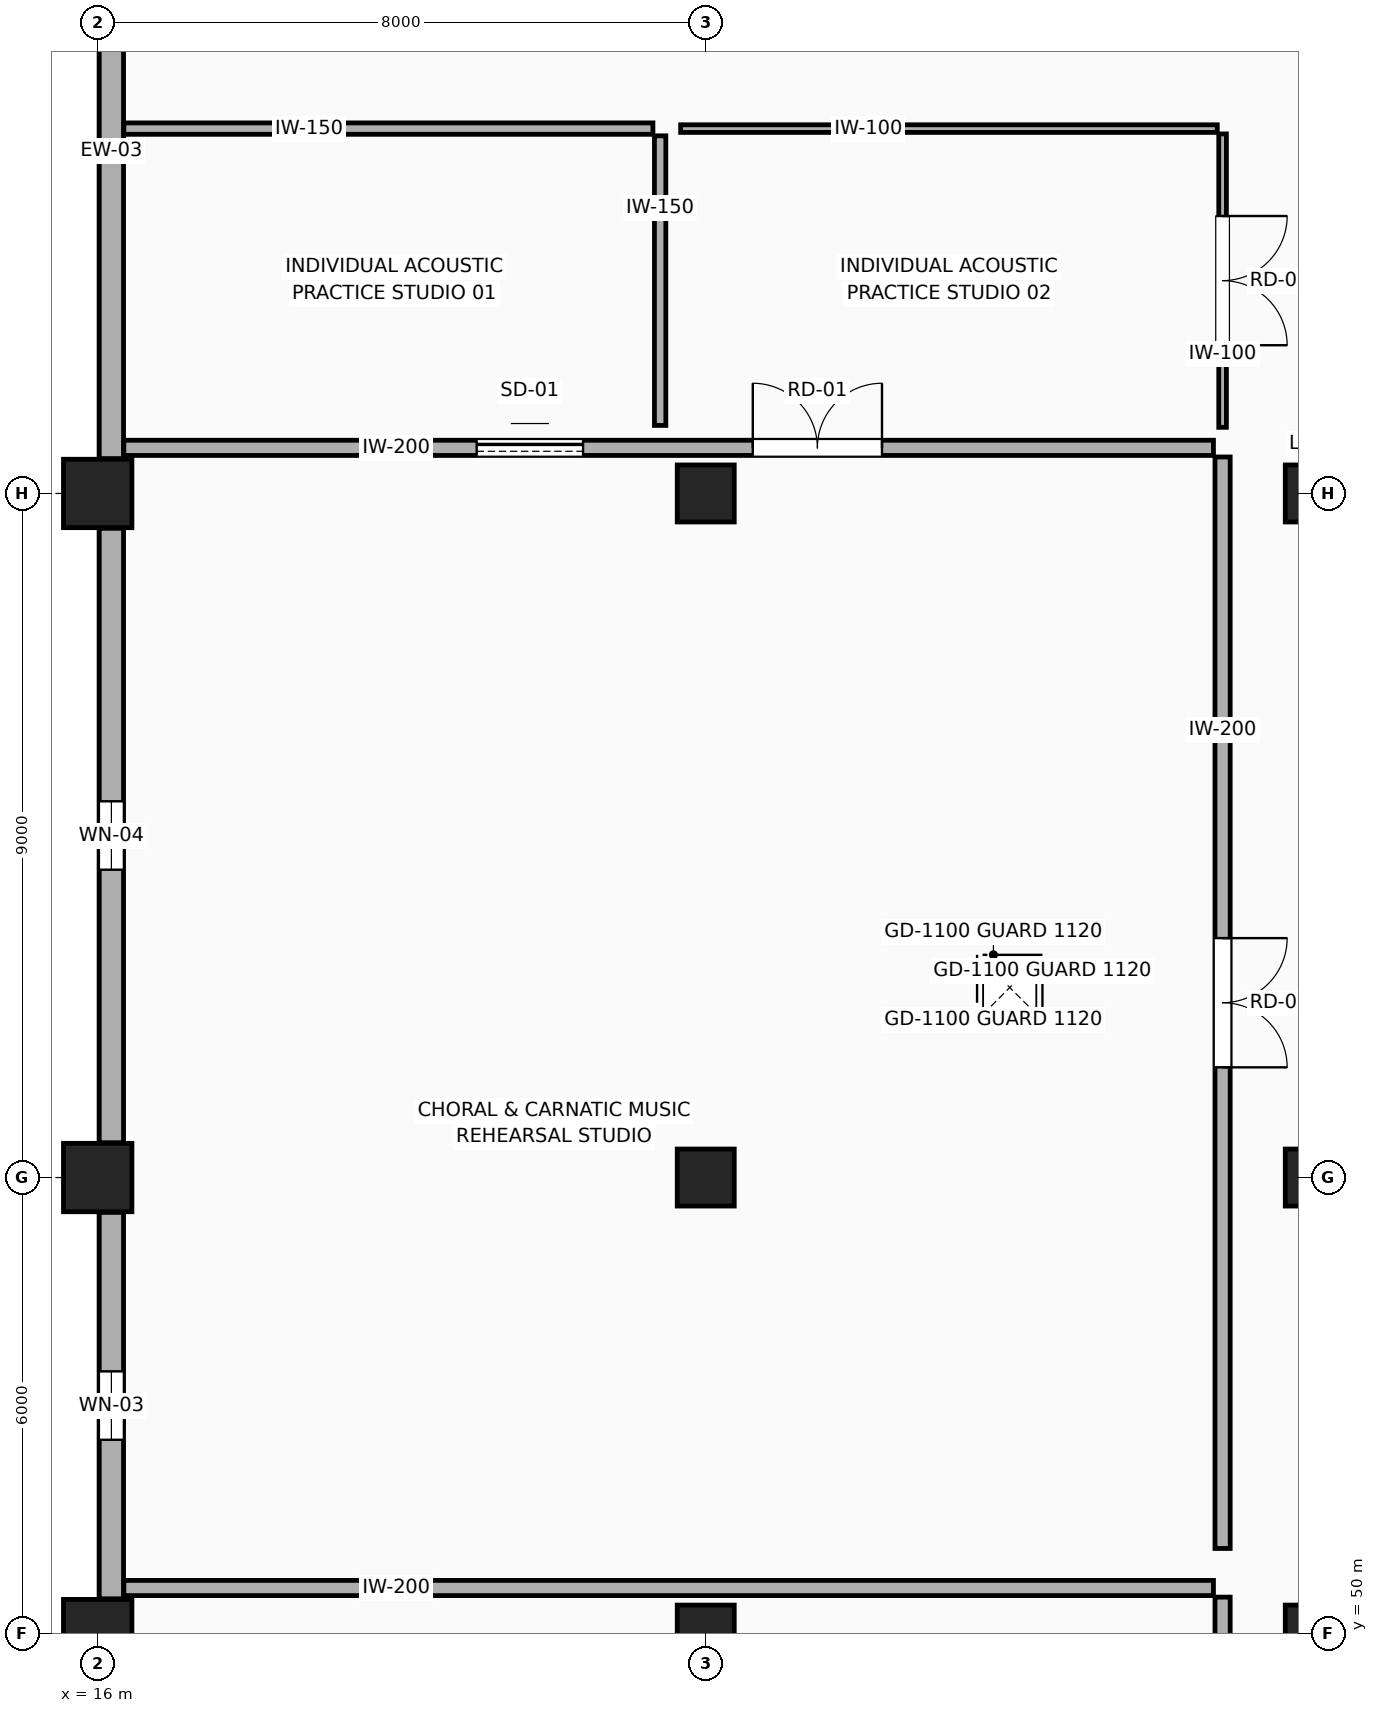
"""IFC4 building model, lengths in metres.
Left out: names, types, materials, properties, quantities, classifications, styles, units other than length and angle.
Written with IfcOpenShell. Run it as: python <this file> out.ifc"""

import sys

from ifc_helpers import new_model, si_unit, direction, frame, frame_2d, origin, origin_2d, place, context, subcontext, project, spatial, rectangle, extrude, element, fill, save


model = new_model("IFC4")
c1 = context("Model", 3, precision=1e-05, world=origin(), true_north=direction((0.0, 1.0)))
c2 = subcontext(c1, "Body", "Model", "MODEL_VIEW")
j1 = project(units=[si_unit("LENGTHUNIT", "METRE"), si_unit("PLANEANGLEUNIT", "RADIAN")], contexts=[c1])
p1 = place(None, origin())
s1 = spatial("IfcSite", under=j1, at=p1, CompositionType="ELEMENT")
p2 = place(p1, origin())
s2 = spatial("IfcBuilding", under=s1, at=p2, CompositionType="ELEMENT")
p3 = place(p2, frame((0.0, 0.0, 19.8)))
s3 = spatial("IfcBuildingStorey", under=s2, at=p3, CompositionType="ELEMENT", Elevation=19.8)
for number, where, z_axis, x_axis in (
    (1, (16.0, 50.0, 0.0), (0.0, 0.0, 1.0), (1.0, 0.0, 0.0)),
    (2, (16.0, 56.0, 0.0), (0.0, 0.0, 1.0), (1.0, 0.0, 0.0)),
    (3, (16.0, 65.0, 0.0), (0.0, 0.0, 1.0), (1.0, 0.0, 0.0)),
):
    element("IfcColumn", number, at=place(p3, frame(where, z_axis=z_axis, x_axis=x_axis)), inside=s3, PredefinedType="COLUMN", context=c2, shape_type="SweptSolid", body=[
        extrude(rectangle(XDim=0.9, YDim=0.9, at=origin_2d()), origin(), (0.0, 0.0, 1.0), 4.5),
    ])
for number, where, z_axis, x_axis in (
    (4, (24.0, 50.0, 0.0), (0.0, 0.0, 1.0), (1.0, 0.0, 0.0)),
    (5, (24.0, 56.0, 0.0), (0.0, 0.0, 1.0), (1.0, 0.0, 0.0)),
    (6, (24.0, 65.0, 0.0), (0.0, 0.0, 1.0), (1.0, 0.0, 0.0)),
    (7, (32.0, 50.0, 0.0), (0.0, 0.0, 1.0), (1.0, 0.0, 0.0)),
    (8, (32.0, 56.0, 0.0), (0.0, 0.0, 1.0), (1.0, 0.0, 0.0)),
    (9, (32.0, 65.0, 0.0), (0.0, 0.0, 1.0), (1.0, 0.0, 0.0)),
):
    element("IfcColumn", number, at=place(p3, frame(where, z_axis=z_axis, x_axis=x_axis)), inside=s3, PredefinedType="COLUMN", context=c2, shape_type="SweptSolid", body=[
        extrude(rectangle(XDim=0.75, YDim=0.75, at=origin_2d()), origin(), (0.0, 0.0, 1.0), 4.5),
    ])
p4 = place(p3, frame((16.18, 50.458, 0.0), z_axis=(0.0, 0.0, 1.0), x_axis=(0.0, 1.0, 0.0)))
e10 = element("IfcWall", 10, at=p4, inside=s3, PredefinedType="STANDARD", context=c2, shape_type="SweptSolid", body=[
    extrude(rectangle(XDim=5.084, YDim=0.32, at=frame_2d((2.542, 0.0))), origin(), (0.0, 0.0, 1.0), 3.785),
])
p5 = place(p4, frame((2.092, 0.0, 0.95)))
e11 = element("IfcOpeningElement", 11, at=p5, cuts=e10, PredefinedType="OPENING", context=c2, shape_type="SweptSolid", body=[
    extrude(rectangle(XDim=0.9, YDim=1.8, at=frame_2d((0.45, 0.9))), frame((0.0, 0.17, 0.0), z_axis=(0.0, -1.0, 0.0), x_axis=(1.0, 0.0, 0.0)), (0.0, 0.0, 1.0), 0.34),
])
p6 = place(p3, frame((16.18, 56.458, 0.0), z_axis=(0.0, 0.0, 1.0), x_axis=(0.0, 1.0, 0.0)))
e12 = element("IfcWall", 12, at=p6, inside=s3, PredefinedType="STANDARD", context=c2, shape_type="SweptSolid", body=[
    extrude(rectangle(XDim=8.084, YDim=0.32, at=frame_2d((4.042, 0.0))), origin(), (0.0, 0.0, 1.0), 3.835),
])
p7 = place(p6, frame((3.592, 0.0, 0.95)))
e13 = element("IfcOpeningElement", 13, at=p7, cuts=e12, PredefinedType="OPENING", context=c2, shape_type="SweptSolid", body=[
    extrude(rectangle(XDim=0.9, YDim=2.1, at=frame_2d((0.45, 1.05))), frame((0.0, 0.17, 0.0), z_axis=(0.0, -1.0, 0.0), x_axis=(1.0, 0.0, 0.0)), (0.0, 0.0, 1.0), 0.34),
])
p8 = place(p3, frame((16.18, 65.458, 0.0), z_axis=(0.0, 0.0, 1.0), x_axis=(0.0, 1.0, 0.0)))
e14 = element("IfcWall", 14, at=p8, inside=s3, PredefinedType="STANDARD", context=c2, shape_type="SweptSolid", body=[
    extrude(rectangle(XDim=8.084, YDim=0.32, at=frame_2d((4.042, 0.0))), origin(), (0.0, 0.0, 1.0), 3.885),
])
p9 = place(p3, frame((16.344, 50.6, 0.0), z_axis=(0.0, 0.0, 1.0), x_axis=(1.0, 0.0, 0.0)))
e15 = element("IfcWall", 15, at=p9, inside=s3, PredefinedType="PARTITIONING", context=c2, shape_type="SweptSolid", body=[
    extrude(rectangle(XDim=14.336, YDim=0.2, at=frame_2d((7.168, 0.0))), origin(), (0.0, 0.0, 1.0), 4.5),
])
p10 = place(p3, frame((30.8, 50.48, 0.0), z_axis=(0.0, 0.0, 1.0), x_axis=(0.0, -1.0, 0.0)))
e16 = element("IfcWall", 16, at=p10, inside=s3, PredefinedType="PARTITIONING", context=c2, shape_type="SweptSolid", body=[
    extrude(rectangle(XDim=19.16, YDim=0.2, at=frame_2d((9.58, 0.0))), origin(), (0.0, 0.0, 1.0), 4.5),
])
p11 = place(p10, frame((8.73, 0.0, 0.0)))
e17 = element("IfcOpeningElement", 17, at=p11, cuts=e16, PredefinedType="OPENING", context=c2, shape_type="SweptSolid", body=[
    extrude(rectangle(XDim=1.7, YDim=2.25, at=frame_2d((0.85, 1.125))), frame((0.0, 0.11, 0.0), z_axis=(0.0, -1.0, 0.0), x_axis=(1.0, 0.0, 0.0)), (0.0, 0.0, 1.0), 0.22),
])
p12 = place(p3, frame((16.344, 65.6, 0.0), z_axis=(0.0, 0.0, 1.0), x_axis=(1.0, 0.0, 0.0)))
e18 = element("IfcWall", 18, at=p12, inside=s3, PredefinedType="PARTITIONING", context=c2, shape_type="SweptSolid", body=[
    extrude(rectangle(XDim=14.336, YDim=0.2, at=frame_2d((7.168, 0.0))), origin(), (0.0, 0.0, 1.0), 4.24),
])
p13 = place(p12, frame((4.642, 0.0, 0.0)))
e19 = element("IfcOpeningElement", 19, at=p13, cuts=e18, PredefinedType="OPENING", context=c2, shape_type="SweptSolid", body=[
    extrude(rectangle(XDim=1.4, YDim=2.15, at=frame_2d((0.7, 1.075))), frame((0.0, 0.11, 0.0), z_axis=(0.0, -1.0, 0.0), x_axis=(1.0, 0.0, 0.0)), (0.0, 0.0, 1.0), 0.22),
])
p14 = place(p12, frame((8.275, 0.0, 0.0)))
e20 = element("IfcOpeningElement", 20, at=p14, cuts=e18, PredefinedType="OPENING", context=c2, shape_type="SweptSolid", body=[
    extrude(rectangle(XDim=1.7, YDim=2.25, at=frame_2d((0.85, 1.125))), frame((0.0, 0.11, 0.0), z_axis=(0.0, -1.0, 0.0), x_axis=(1.0, 0.0, 0.0)), (0.0, 0.0, 1.0), 0.22),
])
p15 = place(p3, frame((30.8, 65.48, 0.0), z_axis=(0.0, 0.0, 1.0), x_axis=(0.0, -1.0, 0.0)))
e21 = element("IfcWall", 21, at=p15, inside=s3, PredefinedType="PARTITIONING", context=c2, shape_type="SweptSolid", body=[
    extrude(rectangle(XDim=14.36, YDim=0.2, at=frame_2d((7.18, 0.0))), origin(), (0.0, 0.0, 1.0), 4.24),
])
p16 = place(p15, frame((6.33, 0.0, 0.0)))
e22 = element("IfcOpeningElement", 22, at=p16, cuts=e21, PredefinedType="OPENING", context=c2, shape_type="SweptSolid", body=[
    extrude(rectangle(XDim=1.7, YDim=2.25, at=frame_2d((0.85, 1.125))), frame((0.0, 0.11, 0.0), z_axis=(0.0, -1.0, 0.0), x_axis=(1.0, 0.0, 0.0)), (0.0, 0.0, 1.0), 0.22),
])
p17 = place(p3, frame((16.344, 69.8, 0.0), z_axis=(0.0, 0.0, 1.0), x_axis=(1.0, 0.0, 0.0)))
e23 = element("IfcWall", 23, at=p17, inside=s3, PredefinedType="PARTITIONING", context=c2, shape_type="SweptSolid", body=[
    extrude(rectangle(XDim=6.961, YDim=0.15, at=frame_2d((3.48, 0.0))), origin(), (0.0, 0.0, 1.0), 4.5),
])
p18 = place(p3, frame((23.4, 69.705, 0.0), z_axis=(0.0, 0.0, 1.0), x_axis=(0.0, -1.0, 0.0)))
e24 = element("IfcWall", 24, at=p18, inside=s3, PredefinedType="PARTITIONING", context=c2, shape_type="SweptSolid", body=[
    extrude(rectangle(XDim=3.81, YDim=0.15, at=frame_2d((1.905, 0.0))), origin(), (0.0, 0.0, 1.0), 4.5),
])
p19 = place(p3, frame((23.67, 69.8, 0.0), z_axis=(0.0, 0.0, 1.0), x_axis=(1.0, 0.0, 0.0)))
e25 = element("IfcWall", 25, at=p19, inside=s3, PredefinedType="PARTITIONING", context=c2, shape_type="SweptSolid", body=[
    extrude(rectangle(XDim=7.06, YDim=0.1, at=frame_2d((3.53, 0.0))), origin(), (0.0, 0.0, 1.0), 4.24),
])
p20 = place(p3, frame((30.8, 69.73, 0.0), z_axis=(0.0, 0.0, 1.0), x_axis=(0.0, -1.0, 0.0)))
e26 = element("IfcWall", 26, at=p20, inside=s3, PredefinedType="PARTITIONING", context=c2, shape_type="SweptSolid", body=[
    extrude(rectangle(XDim=3.86, YDim=0.1, at=frame_2d((1.93, 0.0))), origin(), (0.0, 0.0, 1.0), 4.24),
])
p21 = place(p20, frame((1.08, 0.0, 0.0)))
e27 = element("IfcOpeningElement", 27, at=p21, cuts=e26, PredefinedType="OPENING", context=c2, shape_type="SweptSolid", body=[
    extrude(rectangle(XDim=1.7, YDim=2.25, at=frame_2d((0.85, 1.125))), frame((0.0, 0.06, 0.0), z_axis=(0.0, -1.0, 0.0), x_axis=(1.0, 0.0, 0.0)), (0.0, 0.0, 1.0), 0.12),
])
p22 = place(p5, origin())
e28 = element("IfcWindow", 28, at=p22, inside=s3, PartitioningType="SINGLE_PANEL", PredefinedType="WINDOW", context=c2, shape_type="SweptSolid", body=[
    extrude(rectangle(XDim=0.9, YDim=1.8, at=frame_2d((0.45, 0.9))), frame((0.0, 0.03, 0.0), z_axis=(0.0, -1.0, 0.0), x_axis=(1.0, 0.0, 0.0)), (0.0, 0.0, 1.0), 0.06),
])
fill(e11, e28)
p23 = place(p7, origin())
e29 = element("IfcWindow", 29, at=p23, inside=s3, PartitioningType="SINGLE_PANEL", PredefinedType="WINDOW", context=c2, shape_type="SweptSolid", body=[
    extrude(rectangle(XDim=0.9, YDim=2.1, at=frame_2d((0.45, 1.05))), frame((0.0, 0.03, 0.0), z_axis=(0.0, -1.0, 0.0), x_axis=(1.0, 0.0, 0.0)), (0.0, 0.0, 1.0), 0.06),
])
fill(e13, e29)
p24 = place(p16, origin())
e30 = element("IfcDoor", 30, at=p24, inside=s3, OperationType="DOUBLE_DOOR_SINGLE_SWING", PredefinedType="DOOR", context=c2, shape_type="SweptSolid", body=[
    extrude(rectangle(XDim=1.7, YDim=2.25, at=frame_2d((0.85, 1.125))), frame((0.0, 0.025, 0.0), z_axis=(0.0, -1.0, 0.0), x_axis=(1.0, 0.0, 0.0)), (0.0, 0.0, 1.0), 0.05),
])
fill(e22, e30)
p25 = place(p13, origin())
e31 = element("IfcDoor", 31, at=p25, inside=s3, OperationType="SLIDING_TO_LEFT", PredefinedType="DOOR", context=c2, shape_type="SweptSolid", body=[
    extrude(rectangle(XDim=1.4, YDim=2.15, at=frame_2d((0.7, 1.075))), frame((0.0, 0.025, 0.0), z_axis=(0.0, -1.0, 0.0), x_axis=(1.0, 0.0, 0.0)), (0.0, 0.0, 1.0), 0.05),
])
fill(e19, e31)
p26 = place(p14, origin())
e32 = element("IfcDoor", 32, at=p26, inside=s3, OperationType="DOUBLE_DOOR_SINGLE_SWING", PredefinedType="DOOR", context=c2, shape_type="SweptSolid", body=[
    extrude(rectangle(XDim=1.7, YDim=2.25, at=frame_2d((0.85, 1.125))), frame((0.0, 0.025, 0.0), z_axis=(0.0, -1.0, 0.0), x_axis=(1.0, 0.0, 0.0)), (0.0, 0.0, 1.0), 0.05),
])
fill(e20, e32)
p27 = place(p21, origin())
e33 = element("IfcDoor", 33, at=p27, inside=s3, OperationType="DOUBLE_DOOR_SINGLE_SWING", PredefinedType="DOOR", context=c2, shape_type="SweptSolid", body=[
    extrude(rectangle(XDim=1.7, YDim=2.25, at=frame_2d((0.85, 1.125))), frame((0.0, 0.025, 0.0), z_axis=(0.0, -1.0, 0.0), x_axis=(1.0, 0.0, 0.0)), (0.0, 0.0, 1.0), 0.05),
])
fill(e27, e33)
save(model, sys.argv[1])
